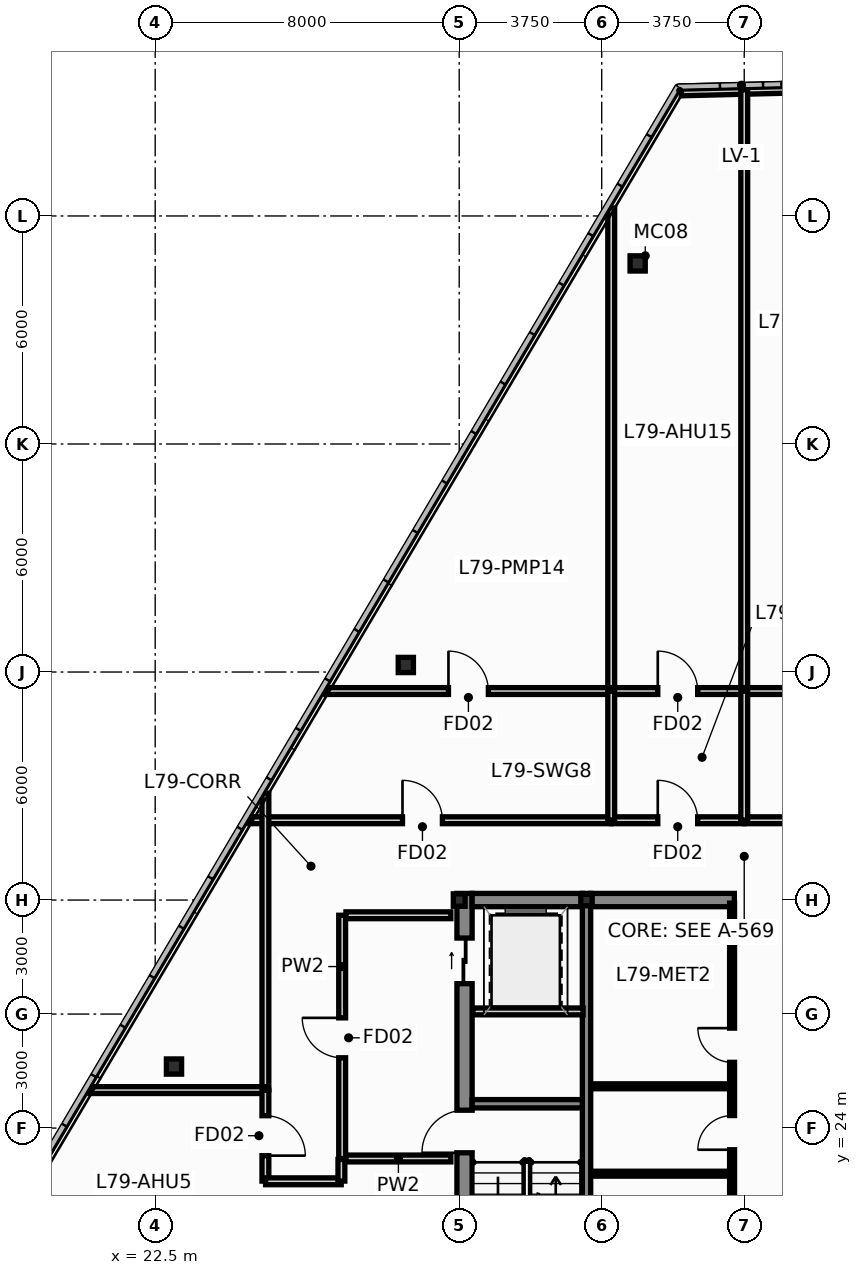
"""IFC4 building model, lengths in metres.
Left out: names, types, materials, properties, quantities, classifications, styles, units other than length and angle.
Written with IfcOpenShell. Run it as: python <this file> out.ifc"""

import sys

from ifc_helpers import new_model, si_unit, direction, frame, frame_2d, origin, origin_2d, place, context, subcontext, project, spatial, rectangle, hollow_rectangle, i_section, extrude, source, transform, mapped, element, fill, save


model = new_model("IFC4")
c1 = context("Model", 3, precision=1e-05, world=origin(), true_north=direction((0.0, 1.0)))
c2 = subcontext(c1, "Body", "Model", "MODEL_VIEW")
j1 = project(units=[si_unit("LENGTHUNIT", "METRE"), si_unit("PLANEANGLEUNIT", "RADIAN")], contexts=[c1])
p1 = place(None, origin())
s1 = spatial("IfcSite", under=j1, at=p1, CompositionType="ELEMENT")
p2 = place(p1, origin())
s2 = spatial("IfcBuilding", under=s1, at=p2, CompositionType="ELEMENT")
p3 = place(p2, frame((0.0, 0.0, 300.0)))
s3 = spatial("IfcBuildingStorey", under=s2, at=p3, CompositionType="ELEMENT", Elevation=300.0)
m1 = source(origin(), c2, "Body", "SweptSolid", [
    extrude(i_section(OverallWidth=0.311, OverallDepth=0.327, WebThickness=0.016, FlangeThickness=0.025, at=origin_2d()), origin(), (0.0, 0.0, 1.0), 3.4),
])
p4 = place(p3, frame((30.5, 30.0, 0.0), z_axis=(0.0, 0.0, 1.0), x_axis=(1.0, 0.0, 0.0)))
e1 = element("IfcColumn", 1, at=p4, inside=s3, PredefinedType="COLUMN", context=c2, shape_type="MappedRepresentation", body=[
    mapped(m1, transform((0.0, 0.0, 0.0), scale=1.0)),
])
m2 = source(origin(), c2, "Body", "SweptSolid", [
    extrude(hollow_rectangle(XDim=0.3, YDim=0.3, WallThickness=0.012, at=origin_2d()), origin(), (0.0, 0.0, 1.0), 3.4),
])
p5 = place(p3, frame((33.85, 30.0, 0.0), z_axis=(0.0, 0.0, 1.0), x_axis=(1.0, 0.0, 0.0)))
e2 = element("IfcColumn", 2, at=p5, inside=s3, PredefinedType="COLUMN", context=c2, shape_type="MappedRepresentation", body=[
    mapped(m2, transform((0.0, 0.0, 0.0), scale=1.0)),
])
p6 = place(p3, frame((30.64, 17.05, 0.0), z_axis=(0.0, 0.0, 1.0), x_axis=(0.0, 1.0, 0.0)))
e3 = element("IfcWall", 3, at=p6, inside=s3, PredefinedType="SHEAR", context=c2, shape_type="SweptSolid", body=[
    extrude(rectangle(XDim=13.125, YDim=0.4, at=frame_2d((6.562, 0.0))), origin(), (0.0, 0.0, 1.0), 3.4),
])
p7 = place(p6, frame((6.3, 0.0, 0.0)))
e4 = element("IfcOpeningElement", 4, at=p7, cuts=e3, PredefinedType="OPENING", context=c2, shape_type="SweptSolid", body=[
    extrude(rectangle(XDim=1.12, YDim=2.15, at=frame_2d((0.56, 1.075))), frame((0.0, 0.212, 0.0), z_axis=(0.0, -1.0, 0.0), x_axis=(1.0, 0.0, 0.0)), (0.0, 0.0, 1.0), 0.424),
])
p8 = place(p6, frame((10.75, 0.0, 0.0)))
e5 = element("IfcOpeningElement", 5, at=p8, cuts=e3, PredefinedType="OPENING", context=c2, shape_type="SweptSolid", body=[
    extrude(rectangle(XDim=1.2, YDim=2.2, at=frame_2d((0.6, 1.1))), frame((0.0, 0.212, 0.0), z_axis=(0.0, -1.0, 0.0), x_axis=(1.0, 0.0, 0.0)), (0.0, 0.0, 1.0), 0.424),
])
p9 = place(p3, frame((30.84, 30.0, 0.0), z_axis=(0.0, 0.0, 1.0), x_axis=(1.0, 0.0, 0.0)))
e6 = element("IfcWall", 6, at=p9, inside=s3, PredefinedType="SHEAR", context=c2, shape_type="SweptSolid", body=[
    extrude(rectangle(XDim=2.9, YDim=0.35, at=frame_2d((1.45, 0.0))), origin(), (0.0, 0.0, 1.0), 3.4),
])
p10 = place(p3, frame((33.96, 30.0, 0.0), z_axis=(0.0, 0.0, 1.0), x_axis=(1.0, 0.0, 0.0)))
e7 = element("IfcWall", 7, at=p10, inside=s3, PredefinedType="SHEAR", context=c2, shape_type="SweptSolid", body=[
    extrude(rectangle(XDim=3.78, YDim=0.35, at=frame_2d((1.89, 0.0))), origin(), (0.0, 0.0, 1.0), 3.4),
])
p11 = place(p3, frame((33.85, 17.05, 0.0), z_axis=(0.0, 0.0, 1.0), x_axis=(0.0, 1.0, 0.0)))
e8 = element("IfcWall", 8, at=p11, inside=s3, PredefinedType="SHEAR", context=c2, shape_type="SweptSolid", body=[
    extrude(rectangle(XDim=13.125, YDim=0.22, at=frame_2d((6.562, 0.0))), origin(), (0.0, 0.0, 1.0), 3.4),
])
p12 = place(p3, frame((30.84, 24.64, 0.0), z_axis=(0.0, 0.0, 1.0), x_axis=(1.0, 0.0, 0.0)))
e9 = element("IfcWall", 9, at=p12, inside=s3, PredefinedType="SHEAR", context=c2, shape_type="SweptSolid", body=[
    extrude(rectangle(XDim=2.9, YDim=0.22, at=frame_2d((1.45, 0.0))), origin(), (0.0, 0.0, 1.0), 3.4),
])
m3 = source(origin(), c2, "Body", "SweptSolid", [
    extrude(hollow_rectangle(XDim=0.4, YDim=0.4, WallThickness=0.016, at=origin_2d()), origin(), (0.0, 0.0, 1.0), 3.396),
])
p13 = place(p3, frame((35.196, 46.751, 0.0), z_axis=(0.01933913956, 0.001437854242, 0.999811947446), x_axis=(-0.074144794539, 0.997247486556, 0.0)))
e10 = element("IfcColumn", 10, at=p13, inside=s3, PredefinedType="COLUMN", context=c2, shape_type="MappedRepresentation", body=[
    mapped(m3, transform((0.0, 0.0, 0.0), scale=1.0)),
])
m4 = source(origin(), c2, "Body", "SweptSolid", [
    extrude(hollow_rectangle(XDim=0.4, YDim=0.4, WallThickness=0.016, at=origin_2d()), origin(), (0.0, 0.0, 1.0), 3.396),
])
for number, where, z_axis, x_axis in (
    (11, (29.095, 36.185, 0.0), (0.016, -0.005, 1.0), (0.298, 0.955, 0.0)),
    (12, (22.995, 25.619, 0.0), (0.012, -0.011, 1.0), (0.678, 0.735, 0.0)),
):
    element("IfcColumn", number, at=place(p3, frame(where, z_axis=z_axis, x_axis=x_axis)), inside=s3, PredefinedType="COLUMN", context=c2, shape_type="MappedRepresentation", body=[
        mapped(m4, transform((0.0, 0.0, 0.0), scale=1.0)),
    ])
p14 = place(p3, frame((36.341, 51.292, 0.0), z_axis=(0.0, 0.0, 1.0), x_axis=(0.999692817097, 0.024784500085, 0.0)))
e13 = element("IfcWall", 13, at=p14, inside=s3, PredefinedType="STANDARD", context=c2, shape_type="SweptSolid", body=[
    extrude(rectangle(XDim=3.172, YDim=0.26, at=frame_2d((1.586, 0.0))), origin(), (0.0, 0.0, 1.0), 3.15),
])
p15 = place(p3, frame((27.42, 23.2, 0.0), z_axis=(0.0, 0.0, 1.0), x_axis=(0.0, 1.0, 0.0)))
e14 = element("IfcWall", 14, at=p15, inside=s3, PredefinedType="PARTITIONING", context=c2, shape_type="SweptSolid", body=[
    extrude(rectangle(XDim=6.4, YDim=0.18, at=frame_2d((3.2, 0.0))), origin(), (0.0, 0.0, 1.0), 2.835),
])
p16 = place(p15, frame((2.65, 0.0, 0.0)))
e15 = element("IfcOpeningElement", 15, at=p16, cuts=e14, PredefinedType="OPENING", context=c2, shape_type="SweptSolid", body=[
    extrude(rectangle(XDim=1.05, YDim=2.15, at=frame_2d((0.525, 1.075))), frame((0.0, 0.102, 0.0), z_axis=(0.0, -1.0, 0.0), x_axis=(1.0, 0.0, 0.0)), (0.0, 0.0, 1.0), 0.204),
])
for number, where, z_axis, x_axis in (
    (16, (27.52, 23.2, 0.0), (0.0, 0.0, 1.0), (1.0, 0.0, 0.0)),
    (17, (27.52, 29.6, 0.0), (0.0, 0.0, 1.0), (1.0, 0.0, 0.0)),
):
    element("IfcWall", number, at=place(p3, frame(where, z_axis=z_axis, x_axis=x_axis)), inside=s3, PredefinedType="PARTITIONING", context=c2, shape_type="SweptSolid", body=[
        extrude(rectangle(XDim=2.76, YDim=0.18, at=frame_2d((1.38, 0.0))), origin(), (0.0, 0.0, 1.0), 3.15),
    ])
p17 = place(p3, frame((30.86, 27.07, 0.0), z_axis=(0.0, 0.0, 1.0), x_axis=(1.0, 0.0, 0.0)))
e18 = element("IfcWall", 18, at=p17, inside=s3, PredefinedType="PARTITIONING", context=c2, shape_type="SweptSolid", body=[
    extrude(rectangle(XDim=2.9, YDim=0.18, at=frame_2d((1.45, 0.0))), origin(), (0.0, 0.0, 1.0), 3.15),
])
for number, where, z_axis, x_axis in (
    (19, (34.02, 22.8, 0.0), (0.0, 0.0, 1.0), (1.0, 0.0, 0.0)),
    (20, (34.02, 25.1, 0.0), (0.0, 0.0, 1.0), (1.0, 0.0, 0.0)),
):
    element("IfcWall", number, at=place(p3, frame(where, z_axis=z_axis, x_axis=x_axis)), inside=s3, PredefinedType="PARTITIONING", context=c2, shape_type="SweptSolid", body=[
        extrude(rectangle(XDim=3.58, YDim=0.13, at=frame_2d((1.79, 0.0))), origin(), (0.0, 0.0, 1.0), 3.15),
    ])
p18 = place(p3, frame((37.68, 20.48, 0.0), z_axis=(0.0, 0.0, 1.0), x_axis=(0.0, 1.0, 0.0)))
e21 = element("IfcWall", 21, at=p18, inside=s3, PredefinedType="PARTITIONING", context=c2, shape_type="SweptSolid", body=[
    extrude(rectangle(XDim=9.44, YDim=0.13, at=frame_2d((4.72, 0.0))), origin(), (0.0, 0.0, 1.0), 3.15),
])
p19 = place(p18, frame((0.65, 0.0, 0.0)))
e22 = element("IfcOpeningElement", 22, at=p19, cuts=e21, PredefinedType="OPENING", context=c2, shape_type="SweptSolid", body=[
    extrude(rectangle(XDim=0.9, YDim=2.1, at=frame_2d((0.45, 1.05))), frame((0.0, 0.077, 0.0), z_axis=(0.0, -1.0, 0.0), x_axis=(1.0, 0.0, 0.0)), (0.0, 0.0, 1.0), 0.154),
])
p20 = place(p18, frame((2.95, 0.0, 0.0)))
e23 = element("IfcOpeningElement", 23, at=p20, cuts=e21, PredefinedType="OPENING", context=c2, shape_type="SweptSolid", body=[
    extrude(rectangle(XDim=0.9, YDim=2.1, at=frame_2d((0.45, 1.05))), frame((0.0, 0.077, 0.0), z_axis=(0.0, -1.0, 0.0), x_axis=(1.0, 0.0, 0.0)), (0.0, 0.0, 1.0), 0.154),
])
p21 = place(p18, frame((5.25, 0.0, 0.0)))
e24 = element("IfcOpeningElement", 24, at=p21, cuts=e21, PredefinedType="OPENING", context=c2, shape_type="SweptSolid", body=[
    extrude(rectangle(XDim=0.9, YDim=2.1, at=frame_2d((0.45, 1.05))), frame((0.0, 0.077, 0.0), z_axis=(0.0, -1.0, 0.0), x_axis=(1.0, 0.0, 0.0)), (0.0, 0.0, 1.0), 0.154),
])
p22 = place(p3, frame((38.0, 35.505, 0.0), z_axis=(0.0, 0.0, 1.0), x_axis=(0.0, 1.0, 0.0)))
e25 = element("IfcWall", 25, at=p22, inside=s3, PredefinedType="PARTITIONING", context=c2, shape_type="SweptSolid", body=[
    extrude(rectangle(XDim=15.815, YDim=0.18, at=frame_2d((7.908, 0.0))), origin(), (0.0, 0.0, 1.0), 3.15),
])
p23 = place(p3, frame((34.5, 35.505, 0.0), z_axis=(0.0, 0.0, 1.0), x_axis=(0.0, 1.0, 0.0)))
e26 = element("IfcWall", 26, at=p23, inside=s3, PredefinedType="PARTITIONING", context=c2, shape_type="SweptSolid", body=[
    extrude(rectangle(XDim=12.705, YDim=0.18, at=frame_2d((6.353, 0.0))), origin(), (0.0, 0.0, 1.0), 2.735),
])
p24 = place(p3, frame((24.988, 32.1, 0.0), z_axis=(0.0, 0.0, 1.0), x_axis=(1.0, 0.0, 0.0)))
e27 = element("IfcWall", 27, at=p24, inside=s3, PredefinedType="PARTITIONING", context=c2, shape_type="SweptSolid", body=[
    extrude(rectangle(XDim=9.508, YDim=0.18, at=frame_2d((4.754, 0.0))), origin(), (0.0, 0.0, 1.0), 2.835),
])
p25 = place(p24, frame((4.02, 0.0, 0.0)))
e28 = element("IfcOpeningElement", 28, at=p25, cuts=e27, PredefinedType="OPENING", context=c2, shape_type="SweptSolid", body=[
    extrude(rectangle(XDim=1.05, YDim=2.15, at=frame_2d((0.525, 1.075))), frame((0.0, 0.102, 0.0), z_axis=(0.0, -1.0, 0.0), x_axis=(1.0, 0.0, 0.0)), (0.0, 0.0, 1.0), 0.204),
])
p26 = place(p3, frame((26.99, 35.5, 0.0), z_axis=(0.0, 0.0, 1.0), x_axis=(1.0, 0.0, 0.0)))
e29 = element("IfcWall", 29, at=p26, inside=s3, PredefinedType="PARTITIONING", context=c2, shape_type="SweptSolid", body=[
    extrude(rectangle(XDim=7.505, YDim=0.18, at=frame_2d((3.752, 0.0))), origin(), (0.0, 0.0, 1.0), 3.15),
])
p27 = place(p26, frame((3.227, 0.0, 0.0)))
e30 = element("IfcOpeningElement", 30, at=p27, cuts=e29, PredefinedType="OPENING", context=c2, shape_type="SweptSolid", body=[
    extrude(rectangle(XDim=1.05, YDim=2.15, at=frame_2d((0.525, 1.075))), frame((0.0, 0.102, 0.0), z_axis=(0.0, -1.0, 0.0), x_axis=(1.0, 0.0, 0.0)), (0.0, 0.0, 1.0), 0.204),
])
p28 = place(p3, frame((25.4, 25.005, 0.0), z_axis=(0.0, 0.0, 1.0), x_axis=(0.0, 1.0, 0.0)))
e31 = element("IfcWall", 31, at=p28, inside=s3, PredefinedType="PARTITIONING", context=c2, shape_type="SweptSolid", body=[
    extrude(rectangle(XDim=7.807, YDim=0.18, at=frame_2d((3.903, 0.0))), origin(), (0.0, 0.0, 1.0), 2.835),
])
p29 = place(p3, frame((20.78, 25.0, 0.0), z_axis=(0.0, 0.0, 1.0), x_axis=(1.0, 0.0, 0.0)))
e32 = element("IfcWall", 32, at=p29, inside=s3, PredefinedType="PARTITIONING", context=c2, shape_type="SweptSolid", body=[
    extrude(rectangle(XDim=4.615, YDim=0.18, at=frame_2d((2.308, 0.0))), origin(), (0.0, 0.0, 1.0), 3.15),
])
p30 = place(p3, frame((34.505, 32.1, 0.0), z_axis=(0.0, 0.0, 1.0), x_axis=(1.0, 0.0, 0.0)))
e33 = element("IfcWall", 33, at=p30, inside=s3, PredefinedType="PARTITIONING", context=c2, shape_type="SweptSolid", body=[
    extrude(rectangle(XDim=3.49, YDim=0.18, at=frame_2d((1.745, 0.0))), origin(), (0.0, 0.0, 1.0), 2.835),
])
p31 = place(p30, frame((1.22, 0.0, 0.0)))
e34 = element("IfcOpeningElement", 34, at=p31, cuts=e33, PredefinedType="OPENING", context=c2, shape_type="SweptSolid", body=[
    extrude(rectangle(XDim=1.05, YDim=2.15, at=frame_2d((0.525, 1.075))), frame((0.0, 0.102, 0.0), z_axis=(0.0, -1.0, 0.0), x_axis=(1.0, 0.0, 0.0)), (0.0, 0.0, 1.0), 0.204),
])
p32 = place(p3, frame((38.005, 32.1, 0.0), z_axis=(0.0, 0.0, 1.0), x_axis=(1.0, 0.0, 0.0)))
e35 = element("IfcWall", 35, at=p32, inside=s3, PredefinedType="PARTITIONING", context=c2, shape_type="SweptSolid", body=[
    extrude(rectangle(XDim=3.49, YDim=0.18, at=frame_2d((1.745, 0.0))), origin(), (0.0, 0.0, 1.0), 2.835),
])
p33 = place(p32, frame((1.22, 0.0, 0.0)))
e36 = element("IfcOpeningElement", 36, at=p33, cuts=e35, PredefinedType="OPENING", context=c2, shape_type="SweptSolid", body=[
    extrude(rectangle(XDim=1.05, YDim=2.15, at=frame_2d((0.525, 1.075))), frame((0.0, 0.102, 0.0), z_axis=(0.0, -1.0, 0.0), x_axis=(1.0, 0.0, 0.0)), (0.0, 0.0, 1.0), 0.204),
])
p34 = place(p3, frame((34.505, 35.5, 0.0), z_axis=(0.0, 0.0, 1.0), x_axis=(1.0, 0.0, 0.0)))
e37 = element("IfcWall", 37, at=p34, inside=s3, PredefinedType="PARTITIONING", context=c2, shape_type="SweptSolid", body=[
    extrude(rectangle(XDim=3.49, YDim=0.18, at=frame_2d((1.745, 0.0))), origin(), (0.0, 0.0, 1.0), 3.15),
])
p35 = place(p34, frame((1.22, 0.0, 0.0)))
e38 = element("IfcOpeningElement", 38, at=p35, cuts=e37, PredefinedType="OPENING", context=c2, shape_type="SweptSolid", body=[
    extrude(rectangle(XDim=1.05, YDim=2.15, at=frame_2d((0.525, 1.075))), frame((0.0, 0.102, 0.0), z_axis=(0.0, -1.0, 0.0), x_axis=(1.0, 0.0, 0.0)), (0.0, 0.0, 1.0), 0.204),
])
p36 = place(p3, frame((38.005, 35.5, 0.0), z_axis=(0.0, 0.0, 1.0), x_axis=(1.0, 0.0, 0.0)))
e39 = element("IfcWall", 39, at=p36, inside=s3, PredefinedType="PARTITIONING", context=c2, shape_type="SweptSolid", body=[
    extrude(rectangle(XDim=3.49, YDim=0.18, at=frame_2d((1.745, 0.0))), origin(), (0.0, 0.0, 1.0), 3.15),
])
p37 = place(p36, frame((1.22, 0.0, 0.0)))
e40 = element("IfcOpeningElement", 40, at=p37, cuts=e39, PredefinedType="OPENING", context=c2, shape_type="SweptSolid", body=[
    extrude(rectangle(XDim=1.05, YDim=2.15, at=frame_2d((0.525, 1.075))), frame((0.0, 0.102, 0.0), z_axis=(0.0, -1.0, 0.0), x_axis=(1.0, 0.0, 0.0)), (0.0, 0.0, 1.0), 0.204),
])
for number, where, z_axis, x_axis in (
    (41, (34.5, 32.105, 0.0), (0.0, 0.0, 1.0), (0.0, 1.0, 0.0)),
    (42, (38.0, 32.105, 0.0), (0.0, 0.0, 1.0), (0.0, 1.0, 0.0)),
):
    element("IfcWall", number, at=place(p3, frame(where, z_axis=z_axis, x_axis=x_axis)), inside=s3, PredefinedType="PARTITIONING", context=c2, shape_type="SweptSolid", body=[
        extrude(rectangle(XDim=3.39, YDim=0.18, at=frame_2d((1.695, 0.0))), origin(), (0.0, 0.0, 1.0), 3.15),
    ])
p38 = place(p3, frame((25.4, 24.995, 0.0), z_axis=(0.0, 0.0, 1.0), x_axis=(0.0, -1.0, 0.0)))
e43 = element("IfcWall", 43, at=p38, inside=s3, PredefinedType="PARTITIONING", context=c2, shape_type="SweptSolid", body=[
    extrude(rectangle(XDim=2.39, YDim=0.18, at=frame_2d((1.195, 0.0))), origin(), (0.0, 0.0, 1.0), 2.835),
])
p39 = place(p38, frame((0.67, 0.0, 0.0)))
e44 = element("IfcOpeningElement", 44, at=p39, cuts=e43, PredefinedType="OPENING", context=c2, shape_type="SweptSolid", body=[
    extrude(rectangle(XDim=1.05, YDim=2.15, at=frame_2d((0.525, 1.075))), frame((0.0, 0.102, 0.0), z_axis=(0.0, -1.0, 0.0), x_axis=(1.0, 0.0, 0.0)), (0.0, 0.0, 1.0), 0.204),
])
p40 = place(p3, frame((25.405, 22.6, 0.0), z_axis=(0.0, 0.0, 1.0), x_axis=(1.0, 0.0, 0.0)))
e45 = element("IfcWall", 45, at=p40, inside=s3, PredefinedType="PARTITIONING", context=c2, shape_type="SweptSolid", body=[
    extrude(rectangle(XDim=1.99, YDim=0.18, at=frame_2d((0.995, 0.0))), origin(), (0.0, 0.0, 1.0), 3.15),
])
p41 = place(p3, frame((27.4, 22.605, 0.0), z_axis=(0.0, 0.0, 1.0), x_axis=(0.0, 1.0, 0.0)))
e46 = element("IfcWall", 46, at=p41, inside=s3, PredefinedType="PARTITIONING", context=c2, shape_type="SweptSolid", body=[
    extrude(rectangle(XDim=0.57, YDim=0.18, at=frame_2d((0.285, 0.0))), origin(), (0.0, 0.0, 1.0), 2.835),
])
p42 = place(p7, origin())
e47 = element("IfcDoor", 47, at=p42, inside=s3, OperationType="SINGLE_SWING_LEFT", PredefinedType="DOOR", context=c2, shape_type="SweptSolid", body=[
    extrude(rectangle(XDim=1.12, YDim=2.15, at=frame_2d((0.56, 1.075))), frame((0.0, 0.025, 0.0), z_axis=(0.0, -1.0, 0.0), x_axis=(1.0, 0.0, 0.0)), (0.0, 0.0, 1.0), 0.05),
])
fill(e4, e47)
p43 = place(p8, origin())
e48 = element("IfcDoor", 48, at=p43, inside=s3, OperationType="SLIDING_TO_LEFT", PredefinedType="DOOR", context=c2, shape_type="SweptSolid", body=[
    extrude(rectangle(XDim=1.2, YDim=2.2, at=frame_2d((0.6, 1.1))), frame((0.0, 0.025, 0.0), z_axis=(0.0, -1.0, 0.0), x_axis=(1.0, 0.0, 0.0)), (0.0, 0.0, 1.0), 0.05),
])
fill(e5, e48)
p44 = place(p16, origin())
e49 = element("IfcDoor", 49, at=p44, inside=s3, OperationType="SINGLE_SWING_RIGHT", PredefinedType="DOOR", context=c2, shape_type="SweptSolid", body=[
    extrude(rectangle(XDim=1.05, YDim=2.15, at=frame_2d((0.525, 1.075))), frame((0.0, 0.025, 0.0), z_axis=(0.0, -1.0, 0.0), x_axis=(1.0, 0.0, 0.0)), (0.0, 0.0, 1.0), 0.05),
])
fill(e15, e49)
p45 = place(p20, origin())
e50 = element("IfcDoor", 50, at=p45, inside=s3, OperationType="SINGLE_SWING_LEFT", PredefinedType="DOOR", context=c2, shape_type="SweptSolid", body=[
    extrude(rectangle(XDim=0.9, YDim=2.1, at=frame_2d((0.45, 1.05))), frame((0.0, 0.025, 0.0), z_axis=(0.0, -1.0, 0.0), x_axis=(1.0, 0.0, 0.0)), (0.0, 0.0, 1.0), 0.05),
])
fill(e23, e50)
p46 = place(p21, origin())
e51 = element("IfcDoor", 51, at=p46, inside=s3, OperationType="SINGLE_SWING_RIGHT", PredefinedType="DOOR", context=c2, shape_type="SweptSolid", body=[
    extrude(rectangle(XDim=0.9, YDim=2.1, at=frame_2d((0.45, 1.05))), frame((0.0, 0.025, 0.0), z_axis=(0.0, -1.0, 0.0), x_axis=(1.0, 0.0, 0.0)), (0.0, 0.0, 1.0), 0.05),
])
fill(e24, e51)
p47 = place(p25, origin())
e52 = element("IfcDoor", 52, at=p47, inside=s3, OperationType="SINGLE_SWING_LEFT", PredefinedType="DOOR", context=c2, shape_type="SweptSolid", body=[
    extrude(rectangle(XDim=1.05, YDim=2.15, at=frame_2d((0.525, 1.075))), frame((0.0, 0.025, 0.0), z_axis=(0.0, -1.0, 0.0), x_axis=(1.0, 0.0, 0.0)), (0.0, 0.0, 1.0), 0.05),
])
fill(e28, e52)
p48 = place(p27, origin())
e53 = element("IfcDoor", 53, at=p48, inside=s3, OperationType="SINGLE_SWING_LEFT", PredefinedType="DOOR", context=c2, shape_type="SweptSolid", body=[
    extrude(rectangle(XDim=1.05, YDim=2.15, at=frame_2d((0.525, 1.075))), frame((0.0, 0.025, 0.0), z_axis=(0.0, -1.0, 0.0), x_axis=(1.0, 0.0, 0.0)), (0.0, 0.0, 1.0), 0.05),
])
fill(e30, e53)
p49 = place(p31, origin())
e54 = element("IfcDoor", 54, at=p49, inside=s3, OperationType="SINGLE_SWING_LEFT", PredefinedType="DOOR", context=c2, shape_type="SweptSolid", body=[
    extrude(rectangle(XDim=1.05, YDim=2.15, at=frame_2d((0.525, 1.075))), frame((0.0, 0.025, 0.0), z_axis=(0.0, -1.0, 0.0), x_axis=(1.0, 0.0, 0.0)), (0.0, 0.0, 1.0), 0.05),
])
fill(e34, e54)
p50 = place(p35, origin())
e55 = element("IfcDoor", 55, at=p50, inside=s3, OperationType="SINGLE_SWING_LEFT", PredefinedType="DOOR", context=c2, shape_type="SweptSolid", body=[
    extrude(rectangle(XDim=1.05, YDim=2.15, at=frame_2d((0.525, 1.075))), frame((0.0, 0.025, 0.0), z_axis=(0.0, -1.0, 0.0), x_axis=(1.0, 0.0, 0.0)), (0.0, 0.0, 1.0), 0.05),
])
fill(e38, e55)
p51 = place(p39, origin())
e56 = element("IfcDoor", 56, at=p51, inside=s3, OperationType="SINGLE_SWING_RIGHT", PredefinedType="DOOR", context=c2, shape_type="SweptSolid", body=[
    extrude(rectangle(XDim=1.05, YDim=2.15, at=frame_2d((0.525, 1.075))), frame((0.0, 0.025, 0.0), z_axis=(0.0, -1.0, 0.0), x_axis=(1.0, 0.0, 0.0)), (0.0, 0.0, 1.0), 0.05),
])
fill(e44, e56)
save(model, sys.argv[1])
